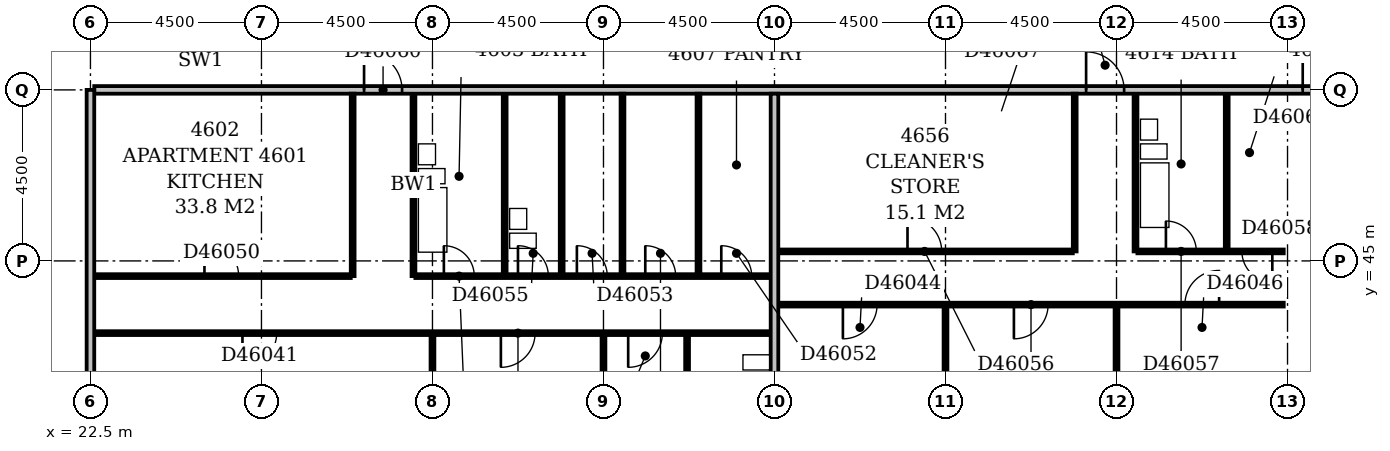
"""IFC4 building model, lengths in metres.
Left out: names, types, materials, properties, quantities, classifications, styles, units other than length and angle.
Written with IfcOpenShell. Run it as: python <this file> out.ifc"""

import sys

from ifc_helpers import new_model, si_unit, direction, frame, frame_2d, origin, place, context, subcontext, project, spatial, rectangle, extrude, element, fill, save


model = new_model("IFC4")
c1 = context("Model", 3, precision=1e-05, world=origin(), true_north=direction((0.0, 1.0)))
c2 = subcontext(c1, "Body", "Model", "MODEL_VIEW")
j1 = project(units=[si_unit("LENGTHUNIT", "METRE"), si_unit("PLANEANGLEUNIT", "RADIAN")], contexts=[c1])
p1 = place(None, origin())
s1 = spatial("IfcSite", under=j1, at=p1, CompositionType="ELEMENT")
p2 = place(p1, origin())
s2 = spatial("IfcBuilding", under=s1, at=p2, CompositionType="ELEMENT")
p3 = place(p2, frame((0.0, 0.0, 182.6)))
s3 = spatial("IfcBuildingStorey", under=s2, at=p3, CompositionType="ELEMENT", Elevation=182.6)
p4 = place(p3, frame((22.5, 36.45, 0.0), z_axis=(0.0, 0.0, 1.0), x_axis=(0.0, 1.0, 0.0)))
e1 = element("IfcWall", 1, at=p4, inside=s3, PredefinedType="PARTITIONING", context=c2, shape_type="SweptSolid", body=[
    extrude(rectangle(XDim=13.05, YDim=0.2, at=frame_2d((6.525, 0.0))), origin(), (0.0, 0.0, 1.0), 3.25),
])
p5 = place(p3, frame((31.5, 36.45, 0.0), z_axis=(0.0, 0.0, 1.0), x_axis=(0.0, 1.0, 0.0)))
e2 = element("IfcWall", 2, at=p5, inside=s3, PredefinedType="PARTITIONING", context=c2, shape_type="SweptSolid", body=[
    extrude(rectangle(XDim=6.6, YDim=0.1, at=frame_2d((3.3, 0.0))), origin(), (0.0, 0.0, 1.0), 3.25),
])
p6 = place(p3, frame((36.0, 36.45, 0.0), z_axis=(0.0, 0.0, 1.0), x_axis=(0.0, 1.0, 0.0)))
e3 = element("IfcWall", 3, at=p6, inside=s3, PredefinedType="PARTITIONING", context=c2, shape_type="SweptSolid", body=[
    extrude(rectangle(XDim=6.6, YDim=0.1, at=frame_2d((3.3, 0.0))), origin(), (0.0, 0.0, 1.0), 2.35),
])
p7 = place(p3, frame((40.5, 36.45, 0.0), z_axis=(0.0, 0.0, 1.0), x_axis=(0.0, 1.0, 0.0)))
e4 = element("IfcWall", 4, at=p7, inside=s3, PredefinedType="PARTITIONING", context=c2, shape_type="SweptSolid", body=[
    extrude(rectangle(XDim=12.95, YDim=0.2, at=frame_2d((6.475, 0.0))), origin(), (0.0, 0.0, 1.0), 3.25),
])
p8 = place(p3, frame((45.0, 36.45, 0.0), z_axis=(0.0, 0.0, 1.0), x_axis=(0.0, 1.0, 0.0)))
e5 = element("IfcWall", 5, at=p8, inside=s3, PredefinedType="PARTITIONING", context=c2, shape_type="SweptSolid", body=[
    extrude(rectangle(XDim=7.35, YDim=0.1, at=frame_2d((3.675, 0.0))), origin(), (0.0, 0.0, 1.0), 2.55),
])
p9 = place(p3, frame((49.5, 36.566, 0.0), z_axis=(0.0, 0.0, 1.0), x_axis=(0.0, 1.0, 0.0)))
e6 = element("IfcWall", 6, at=p9, inside=s3, PredefinedType="PARTITIONING", context=c2, shape_type="SweptSolid", body=[
    extrude(rectangle(XDim=7.234, YDim=0.1, at=frame_2d((3.617, 0.0))), origin(), (0.0, 0.0, 1.0), 3.25),
])
p10 = place(p3, frame((38.2, 40.2, 0.0), z_axis=(0.0, 0.0, 1.0), x_axis=(0.0, 1.0, 0.0)))
e7 = element("IfcWall", 7, at=p10, inside=s3, PredefinedType="PLUMBINGWALL", context=c2, shape_type="SweptSolid", body=[
    extrude(rectangle(XDim=2.85, YDim=0.1, at=frame_2d((1.425, 0.0))), origin(), (0.0, 0.0, 1.0), 3.25),
])
p11 = place(p10, frame((1.05, 0.0, 0.0)))
e8 = element("IfcOpeningElement", 8, at=p11, cuts=e7, PredefinedType="OPENING", context=c2, shape_type="SweptSolid", body=[
    extrude(rectangle(XDim=0.8, YDim=2.1, at=frame_2d((0.4, 1.05))), frame((0.0, 0.062, 0.0), z_axis=(0.0, -1.0, 0.0), x_axis=(1.0, 0.0, 0.0)), (0.0, 0.0, 1.0), 0.124),
])
p12 = place(p3, frame((22.6, 43.1, 0.0), z_axis=(0.0, 0.0, 1.0), x_axis=(1.0, 0.0, 0.0)))
e9 = element("IfcWall", 9, at=p12, inside=s3, PredefinedType="PARTITIONING", context=c2, shape_type="SweptSolid", body=[
    extrude(rectangle(XDim=17.8, YDim=0.1, at=frame_2d((8.9, 0.0))), origin(), (0.0, 0.0, 1.0), 3.25),
])
p13 = place(p12, frame((3.9, 0.0, 0.0)))
e10 = element("IfcOpeningElement", 10, at=p13, cuts=e9, PredefinedType="OPENING", context=c2, shape_type="SweptSolid", body=[
    extrude(rectangle(XDim=0.9, YDim=2.1, at=frame_2d((0.45, 1.05))), frame((0.0, 0.062, 0.0), z_axis=(0.0, -1.0, 0.0), x_axis=(1.0, 0.0, 0.0)), (0.0, 0.0, 1.0), 0.124),
])
p14 = place(p12, frame((10.7, 0.0, 0.0)))
e11 = element("IfcOpeningElement", 11, at=p14, cuts=e9, PredefinedType="OPENING", context=c2, shape_type="SweptSolid", body=[
    extrude(rectangle(XDim=0.9, YDim=2.1, at=frame_2d((0.45, 1.05))), frame((0.0, 0.062, 0.0), z_axis=(0.0, -1.0, 0.0), x_axis=(1.0, 0.0, 0.0)), (0.0, 0.0, 1.0), 0.124),
])
p15 = place(p12, frame((14.05, 0.0, 0.0)))
e12 = element("IfcOpeningElement", 12, at=p15, cuts=e9, PredefinedType="OPENING", context=c2, shape_type="SweptSolid", body=[
    extrude(rectangle(XDim=0.9, YDim=2.1, at=frame_2d((0.45, 1.05))), frame((0.0, 0.062, 0.0), z_axis=(0.0, -1.0, 0.0), x_axis=(1.0, 0.0, 0.0)), (0.0, 0.0, 1.0), 0.124),
])
p16 = place(p3, frame((40.6, 43.85, 0.0), z_axis=(0.0, 0.0, 1.0), x_axis=(1.0, 0.0, 0.0)))
e13 = element("IfcWall", 13, at=p16, inside=s3, PredefinedType="PARTITIONING", context=c2, shape_type="SweptSolid", body=[
    extrude(rectangle(XDim=13.3, YDim=0.1, at=frame_2d((6.65, 0.0))), origin(), (0.0, 0.0, 1.0), 3.25),
])
p17 = place(p16, frame((1.7, 0.0, 0.0)))
e14 = element("IfcOpeningElement", 14, at=p17, cuts=e13, PredefinedType="OPENING", context=c2, shape_type="SweptSolid", body=[
    extrude(rectangle(XDim=0.9, YDim=2.1, at=frame_2d((0.45, 1.05))), frame((0.0, 0.062, 0.0), z_axis=(0.0, -1.0, 0.0), x_axis=(1.0, 0.0, 0.0)), (0.0, 0.0, 1.0), 0.124),
])
p18 = place(p16, frame((6.2, 0.0, 0.0)))
e15 = element("IfcOpeningElement", 15, at=p18, cuts=e13, PredefinedType="OPENING", context=c2, shape_type="SweptSolid", body=[
    extrude(rectangle(XDim=0.9, YDim=2.1, at=frame_2d((0.45, 1.05))), frame((0.0, 0.062, 0.0), z_axis=(0.0, -1.0, 0.0), x_axis=(1.0, 0.0, 0.0)), (0.0, 0.0, 1.0), 0.124),
])
p19 = place(p16, frame((10.7, 0.0, 0.0)))
e16 = element("IfcOpeningElement", 16, at=p19, cuts=e13, PredefinedType="OPENING", context=c2, shape_type="SweptSolid", body=[
    extrude(rectangle(XDim=0.9, YDim=2.1, at=frame_2d((0.45, 1.05))), frame((0.0, 0.062, 0.0), z_axis=(0.0, -1.0, 0.0), x_axis=(1.0, 0.0, 0.0)), (0.0, 0.0, 1.0), 0.124),
])
p20 = place(p3, frame((22.6, 44.6, 0.0), z_axis=(0.0, 0.0, 1.0), x_axis=(1.0, 0.0, 0.0)))
e17 = element("IfcWall", 17, at=p20, inside=s3, PredefinedType="PARTITIONING", context=c2, shape_type="SweptSolid", body=[
    extrude(rectangle(XDim=6.75, YDim=0.1, at=frame_2d((3.375, 0.0))), origin(), (0.0, 0.0, 1.0), 3.25),
])
p21 = place(p20, frame((2.9, 0.0, 0.0)))
e18 = element("IfcOpeningElement", 18, at=p21, cuts=e17, PredefinedType="OPENING", context=c2, shape_type="SweptSolid", body=[
    extrude(rectangle(XDim=0.9, YDim=2.1, at=frame_2d((0.45, 1.05))), frame((0.0, 0.062, 0.0), z_axis=(0.0, -1.0, 0.0), x_axis=(1.0, 0.0, 0.0)), (0.0, 0.0, 1.0), 0.124),
])
p22 = place(p3, frame((29.4, 44.6, 0.0), z_axis=(0.0, 0.0, 1.0), x_axis=(0.0, 1.0, 0.0)))
e19 = element("IfcWall", 19, at=p22, inside=s3, PredefinedType="PARTITIONING", context=c2, shape_type="SweptSolid", body=[
    extrude(rectangle(XDim=4.8, YDim=0.1, at=frame_2d((2.4, 0.0))), origin(), (0.0, 0.0, 1.0), 3.25),
])
p23 = place(p3, frame((31.0, 44.6, 0.0), z_axis=(0.0, 0.0, 1.0), x_axis=(0.0, 1.0, 0.0)))
e20 = element("IfcWall", 20, at=p23, inside=s3, PredefinedType="PLUMBINGWALL", context=c2, shape_type="SweptSolid", body=[
    extrude(rectangle(XDim=4.8, YDim=0.1, at=frame_2d((2.4, 0.0))), origin(), (0.0, 0.0, 1.0), 3.25),
])
p24 = place(p3, frame((31.05, 44.6, 0.0), z_axis=(0.0, 0.0, 1.0), x_axis=(1.0, 0.0, 0.0)))
e21 = element("IfcWall", 21, at=p24, inside=s3, PredefinedType="PARTITIONING", context=c2, shape_type="SweptSolid", body=[
    extrude(rectangle(XDim=9.35, YDim=0.1, at=frame_2d((4.675, 0.0))), origin(), (0.0, 0.0, 1.0), 3.25),
])
p25 = place(p24, frame((0.75, 0.0, 0.0)))
e22 = element("IfcOpeningElement", 22, at=p25, cuts=e21, PredefinedType="OPENING", context=c2, shape_type="SweptSolid", body=[
    extrude(rectangle(XDim=0.8, YDim=2.1, at=frame_2d((0.4, 1.05))), frame((0.0, 0.062, 0.0), z_axis=(0.0, -1.0, 0.0), x_axis=(1.0, 0.0, 0.0)), (0.0, 0.0, 1.0), 0.124),
])
p26 = place(p24, frame((8.05, 0.0, 0.0)))
e23 = element("IfcOpeningElement", 23, at=p26, cuts=e21, PredefinedType="OPENING", context=c2, shape_type="SweptSolid", body=[
    extrude(rectangle(XDim=0.8, YDim=2.1, at=frame_2d((0.4, 1.05))), frame((0.0, 0.062, 0.0), z_axis=(0.0, -1.0, 0.0), x_axis=(1.0, 0.0, 0.0)), (0.0, 0.0, 1.0), 0.124),
])
p27 = place(p24, frame((4.25, 0.0, 0.0)))
e24 = element("IfcOpeningElement", 24, at=p27, cuts=e21, PredefinedType="OPENING", context=c2, shape_type="SweptSolid", body=[
    extrude(rectangle(XDim=0.8, YDim=2.1, at=frame_2d((0.4, 1.05))), frame((0.0, 0.062, 0.0), z_axis=(0.0, -1.0, 0.0), x_axis=(1.0, 0.0, 0.0)), (0.0, 0.0, 1.0), 0.124),
])
p28 = place(p24, frame((6.05, 0.0, 0.0)))
e25 = element("IfcOpeningElement", 25, at=p28, cuts=e21, PredefinedType="OPENING", context=c2, shape_type="SweptSolid", body=[
    extrude(rectangle(XDim=0.8, YDim=2.1, at=frame_2d((0.4, 1.05))), frame((0.0, 0.062, 0.0), z_axis=(0.0, -1.0, 0.0), x_axis=(1.0, 0.0, 0.0)), (0.0, 0.0, 1.0), 0.124),
])
p29 = place(p24, frame((2.7, 0.0, 0.0)))
e26 = element("IfcOpeningElement", 26, at=p29, cuts=e21, PredefinedType="OPENING", context=c2, shape_type="SweptSolid", body=[
    extrude(rectangle(XDim=0.8, YDim=2.1, at=frame_2d((0.4, 1.05))), frame((0.0, 0.062, 0.0), z_axis=(0.0, -1.0, 0.0), x_axis=(1.0, 0.0, 0.0)), (0.0, 0.0, 1.0), 0.124),
])
for number, where, z_axis, x_axis in (
    (27, (33.4, 44.65, 0.0), (0.0, 0.0, 1.0), (0.0, 1.0, 0.0)),
    (28, (34.9, 44.65, 0.0), (0.0, 0.0, 1.0), (0.0, 1.0, 0.0)),
):
    element("IfcWall", number, at=place(p3, frame(where, z_axis=z_axis, x_axis=x_axis)), inside=s3, PredefinedType="PLUMBINGWALL", context=c2, shape_type="SweptSolid", body=[
        extrude(rectangle(XDim=4.75, YDim=0.1, at=frame_2d((2.375, 0.0))), origin(), (0.0, 0.0, 1.0), 3.25),
    ])
p30 = place(p3, frame((36.5, 44.65, 0.0), z_axis=(0.0, 0.0, 1.0), x_axis=(0.0, 1.0, 0.0)))
e29 = element("IfcWall", 29, at=p30, inside=s3, PredefinedType="PARTITIONING", context=c2, shape_type="SweptSolid", body=[
    extrude(rectangle(XDim=4.75, YDim=0.1, at=frame_2d((2.375, 0.0))), origin(), (0.0, 0.0, 1.0), 2.35),
])
p31 = place(p3, frame((38.5, 44.65, 0.0), z_axis=(0.0, 0.0, 1.0), x_axis=(0.0, 1.0, 0.0)))
e30 = element("IfcWall", 30, at=p31, inside=s3, PredefinedType="PARTITIONING", context=c2, shape_type="SweptSolid", body=[
    extrude(rectangle(XDim=4.75, YDim=0.1, at=frame_2d((2.375, 0.0))), origin(), (0.0, 0.0, 1.0), 3.25),
])
p32 = place(p3, frame((40.6, 45.25, 0.0), z_axis=(0.0, 0.0, 1.0), x_axis=(1.0, 0.0, 0.0)))
e31 = element("IfcWall", 31, at=p32, inside=s3, PredefinedType="PARTITIONING", context=c2, shape_type="SweptSolid", body=[
    extrude(rectangle(XDim=7.75, YDim=0.1, at=frame_2d((3.875, 0.0))), origin(), (0.0, 0.0, 1.0), 3.25),
])
p33 = place(p32, frame((3.4, 0.0, 0.0)))
e32 = element("IfcOpeningElement", 32, at=p33, cuts=e31, PredefinedType="OPENING", context=c2, shape_type="SweptSolid", body=[
    extrude(rectangle(XDim=0.9, YDim=2.1, at=frame_2d((0.45, 1.05))), frame((0.0, 0.062, 0.0), z_axis=(0.0, -1.0, 0.0), x_axis=(1.0, 0.0, 0.0)), (0.0, 0.0, 1.0), 0.124),
])
p34 = place(p3, frame((48.4, 45.25, 0.0), z_axis=(0.0, 0.0, 1.0), x_axis=(0.0, 1.0, 0.0)))
e33 = element("IfcWall", 33, at=p34, inside=s3, PredefinedType="PARTITIONING", context=c2, shape_type="SweptSolid", body=[
    extrude(rectangle(XDim=4.15, YDim=0.1, at=frame_2d((2.075, 0.0))), origin(), (0.0, 0.0, 1.0), 3.25),
])
p35 = place(p3, frame((50.0, 45.25, 0.0), z_axis=(0.0, 0.0, 1.0), x_axis=(0.0, 1.0, 0.0)))
e34 = element("IfcWall", 34, at=p35, inside=s3, PredefinedType="PLUMBINGWALL", context=c2, shape_type="SweptSolid", body=[
    extrude(rectangle(XDim=4.15, YDim=0.1, at=frame_2d((2.075, 0.0))), origin(), (0.0, 0.0, 1.0), 3.25),
])
p36 = place(p3, frame((50.05, 45.25, 0.0), z_axis=(0.0, 0.0, 1.0), x_axis=(1.0, 0.0, 0.0)))
e35 = element("IfcWall", 35, at=p36, inside=s3, PredefinedType="PARTITIONING", context=c2, shape_type="SweptSolid", body=[
    extrude(rectangle(XDim=3.85, YDim=0.1, at=frame_2d((1.925, 0.0))), origin(), (0.0, 0.0, 1.0), 3.25),
])
p37 = place(p36, frame((0.75, 0.0, 0.0)))
e36 = element("IfcOpeningElement", 36, at=p37, cuts=e35, PredefinedType="OPENING", context=c2, shape_type="SweptSolid", body=[
    extrude(rectangle(XDim=0.8, YDim=2.1, at=frame_2d((0.4, 1.05))), frame((0.0, 0.062, 0.0), z_axis=(0.0, -1.0, 0.0), x_axis=(1.0, 0.0, 0.0)), (0.0, 0.0, 1.0), 0.124),
])
p38 = place(p36, frame((2.75, 0.0, 0.0)))
e37 = element("IfcOpeningElement", 37, at=p38, cuts=e35, PredefinedType="OPENING", context=c2, shape_type="SweptSolid", body=[
    extrude(rectangle(XDim=0.8, YDim=2.1, at=frame_2d((0.4, 1.05))), frame((0.0, 0.062, 0.0), z_axis=(0.0, -1.0, 0.0), x_axis=(1.0, 0.0, 0.0)), (0.0, 0.0, 1.0), 0.124),
])
p39 = place(p3, frame((52.4, 45.3, 0.0), z_axis=(0.0, 0.0, 1.0), x_axis=(0.0, 1.0, 0.0)))
e38 = element("IfcWall", 38, at=p39, inside=s3, PredefinedType="PLUMBINGWALL", context=c2, shape_type="SweptSolid", body=[
    extrude(rectangle(XDim=4.1, YDim=0.1, at=frame_2d((2.05, 0.0))), origin(), (0.0, 0.0, 1.0), 3.25),
])
p40 = place(p3, frame((22.6, 49.5, 0.0), z_axis=(0.0, 0.0, 1.0), x_axis=(1.0, 0.0, 0.0)))
e39 = element("IfcWall", 39, at=p40, inside=s3, PredefinedType="PARTITIONING", context=c2, shape_type="SweptSolid", body=[
    extrude(rectangle(XDim=44.45, YDim=0.2, at=frame_2d((22.225, 0.0))), origin(), (0.0, 0.0, 1.0), 3.25),
])
p41 = place(p40, frame((7.1, 0.0, 0.0)))
e40 = element("IfcOpeningElement", 40, at=p41, cuts=e39, PredefinedType="OPENING", context=c2, shape_type="SweptSolid", body=[
    extrude(rectangle(XDim=1.0, YDim=2.1, at=frame_2d((0.5, 1.05))), frame((0.0, 0.112, 0.0), z_axis=(0.0, -1.0, 0.0), x_axis=(1.0, 0.0, 0.0)), (0.0, 0.0, 1.0), 0.224),
])
p42 = place(p40, frame((26.1, 0.0, 0.0)))
e41 = element("IfcOpeningElement", 41, at=p42, cuts=e39, PredefinedType="OPENING", context=c2, shape_type="SweptSolid", body=[
    extrude(rectangle(XDim=1.0, YDim=2.1, at=frame_2d((0.5, 1.05))), frame((0.0, 0.112, 0.0), z_axis=(0.0, -1.0, 0.0), x_axis=(1.0, 0.0, 0.0)), (0.0, 0.0, 1.0), 0.224),
])
p43 = place(p40, frame((31.8, 0.0, 0.0)))
e42 = element("IfcOpeningElement", 42, at=p43, cuts=e39, PredefinedType="OPENING", context=c2, shape_type="SweptSolid", body=[
    extrude(rectangle(XDim=1.0, YDim=2.1, at=frame_2d((0.5, 1.05))), frame((0.0, 0.112, 0.0), z_axis=(0.0, -1.0, 0.0), x_axis=(1.0, 0.0, 0.0)), (0.0, 0.0, 1.0), 0.224),
])
p44 = place(p13, frame((0.9, 0.0, 0.0), z_axis=(0.0, 0.0, 1.0), x_axis=(-1.0, 0.0, 0.0)))
e43 = element("IfcDoor", 43, at=p44, inside=s3, OperationType="SINGLE_SWING_RIGHT", PredefinedType="DOOR", context=c2, shape_type="SweptSolid", body=[
    extrude(rectangle(XDim=0.9, YDim=2.1, at=frame_2d((0.45, 1.05))), frame((0.0, 0.025, 0.0), z_axis=(0.0, -1.0, 0.0), x_axis=(1.0, 0.0, 0.0)), (0.0, 0.0, 1.0), 0.05),
])
fill(e10, e43)
p45 = place(p14, frame((0.9, 0.0, 0.0), z_axis=(0.0, 0.0, 1.0), x_axis=(-1.0, 0.0, 0.0)))
e44 = element("IfcDoor", 44, at=p45, inside=s3, OperationType="SINGLE_SWING_RIGHT", PredefinedType="DOOR", context=c2, shape_type="SweptSolid", body=[
    extrude(rectangle(XDim=0.9, YDim=2.1, at=frame_2d((0.45, 1.05))), frame((0.0, 0.025, 0.0), z_axis=(0.0, -1.0, 0.0), x_axis=(1.0, 0.0, 0.0)), (0.0, 0.0, 1.0), 0.05),
])
fill(e11, e44)
p46 = place(p15, frame((0.9, 0.0, 0.0), z_axis=(0.0, 0.0, 1.0), x_axis=(-1.0, 0.0, 0.0)))
e45 = element("IfcDoor", 45, at=p46, inside=s3, OperationType="SINGLE_SWING_RIGHT", PredefinedType="DOOR", context=c2, shape_type="SweptSolid", body=[
    extrude(rectangle(XDim=0.9, YDim=2.1, at=frame_2d((0.45, 1.05))), frame((0.0, 0.025, 0.0), z_axis=(0.0, -1.0, 0.0), x_axis=(1.0, 0.0, 0.0)), (0.0, 0.0, 1.0), 0.05),
])
fill(e12, e45)
p47 = place(p17, frame((0.9, 0.0, 0.0), z_axis=(0.0, 0.0, 1.0), x_axis=(-1.0, 0.0, 0.0)))
e46 = element("IfcDoor", 46, at=p47, inside=s3, OperationType="SINGLE_SWING_RIGHT", PredefinedType="DOOR", context=c2, shape_type="SweptSolid", body=[
    extrude(rectangle(XDim=0.9, YDim=2.1, at=frame_2d((0.45, 1.05))), frame((0.0, 0.025, 0.0), z_axis=(0.0, -1.0, 0.0), x_axis=(1.0, 0.0, 0.0)), (0.0, 0.0, 1.0), 0.05),
])
fill(e14, e46)
p48 = place(p18, frame((0.9, 0.0, 0.0), z_axis=(0.0, 0.0, 1.0), x_axis=(-1.0, 0.0, 0.0)))
e47 = element("IfcDoor", 47, at=p48, inside=s3, OperationType="SINGLE_SWING_RIGHT", PredefinedType="DOOR", context=c2, shape_type="SweptSolid", body=[
    extrude(rectangle(XDim=0.9, YDim=2.1, at=frame_2d((0.45, 1.05))), frame((0.0, 0.025, 0.0), z_axis=(0.0, -1.0, 0.0), x_axis=(1.0, 0.0, 0.0)), (0.0, 0.0, 1.0), 0.05),
])
fill(e15, e47)
p49 = place(p19, frame((0.9, 0.0, 0.0), z_axis=(0.0, 0.0, 1.0), x_axis=(-1.0, 0.0, 0.0)))
e48 = element("IfcDoor", 48, at=p49, inside=s3, OperationType="SINGLE_SWING_LEFT", PredefinedType="DOOR", context=c2, shape_type="SweptSolid", body=[
    extrude(rectangle(XDim=0.9, YDim=2.1, at=frame_2d((0.45, 1.05))), frame((0.0, 0.025, 0.0), z_axis=(0.0, -1.0, 0.0), x_axis=(1.0, 0.0, 0.0)), (0.0, 0.0, 1.0), 0.05),
])
fill(e16, e48)
p50 = place(p21, origin())
e49 = element("IfcDoor", 49, at=p50, inside=s3, OperationType="SINGLE_SWING_LEFT", PredefinedType="DOOR", context=c2, shape_type="SweptSolid", body=[
    extrude(rectangle(XDim=0.9, YDim=2.1, at=frame_2d((0.45, 1.05))), frame((0.0, 0.025, 0.0), z_axis=(0.0, -1.0, 0.0), x_axis=(1.0, 0.0, 0.0)), (0.0, 0.0, 1.0), 0.05),
])
fill(e18, e49)
p51 = place(p25, origin())
e50 = element("IfcDoor", 50, at=p51, inside=s3, OperationType="SINGLE_SWING_LEFT", PredefinedType="DOOR", context=c2, shape_type="SweptSolid", body=[
    extrude(rectangle(XDim=0.8, YDim=2.1, at=frame_2d((0.4, 1.05))), frame((0.0, 0.025, 0.0), z_axis=(0.0, -1.0, 0.0), x_axis=(1.0, 0.0, 0.0)), (0.0, 0.0, 1.0), 0.05),
])
fill(e22, e50)
p52 = place(p26, origin())
e51 = element("IfcDoor", 51, at=p52, inside=s3, OperationType="SINGLE_SWING_LEFT", PredefinedType="DOOR", context=c2, shape_type="SweptSolid", body=[
    extrude(rectangle(XDim=0.8, YDim=2.1, at=frame_2d((0.4, 1.05))), frame((0.0, 0.025, 0.0), z_axis=(0.0, -1.0, 0.0), x_axis=(1.0, 0.0, 0.0)), (0.0, 0.0, 1.0), 0.05),
])
fill(e23, e51)
p53 = place(p27, origin())
e52 = element("IfcDoor", 52, at=p53, inside=s3, OperationType="SINGLE_SWING_LEFT", PredefinedType="DOOR", context=c2, shape_type="SweptSolid", body=[
    extrude(rectangle(XDim=0.8, YDim=2.1, at=frame_2d((0.4, 1.05))), frame((0.0, 0.025, 0.0), z_axis=(0.0, -1.0, 0.0), x_axis=(1.0, 0.0, 0.0)), (0.0, 0.0, 1.0), 0.05),
])
fill(e24, e52)
p54 = place(p28, origin())
e53 = element("IfcDoor", 53, at=p54, inside=s3, OperationType="SINGLE_SWING_LEFT", PredefinedType="DOOR", context=c2, shape_type="SweptSolid", body=[
    extrude(rectangle(XDim=0.8, YDim=2.1, at=frame_2d((0.4, 1.05))), frame((0.0, 0.025, 0.0), z_axis=(0.0, -1.0, 0.0), x_axis=(1.0, 0.0, 0.0)), (0.0, 0.0, 1.0), 0.05),
])
fill(e25, e53)
p55 = place(p29, origin())
e54 = element("IfcDoor", 54, at=p55, inside=s3, OperationType="SINGLE_SWING_LEFT", PredefinedType="DOOR", context=c2, shape_type="SweptSolid", body=[
    extrude(rectangle(XDim=0.8, YDim=2.1, at=frame_2d((0.4, 1.05))), frame((0.0, 0.025, 0.0), z_axis=(0.0, -1.0, 0.0), x_axis=(1.0, 0.0, 0.0)), (0.0, 0.0, 1.0), 0.05),
])
fill(e26, e54)
p56 = place(p33, origin())
e55 = element("IfcDoor", 55, at=p56, inside=s3, OperationType="SINGLE_SWING_LEFT", PredefinedType="DOOR", context=c2, shape_type="SweptSolid", body=[
    extrude(rectangle(XDim=0.9, YDim=2.1, at=frame_2d((0.45, 1.05))), frame((0.0, 0.025, 0.0), z_axis=(0.0, -1.0, 0.0), x_axis=(1.0, 0.0, 0.0)), (0.0, 0.0, 1.0), 0.05),
])
fill(e32, e55)
p57 = place(p37, origin())
e56 = element("IfcDoor", 56, at=p57, inside=s3, OperationType="SINGLE_SWING_LEFT", PredefinedType="DOOR", context=c2, shape_type="SweptSolid", body=[
    extrude(rectangle(XDim=0.8, YDim=2.1, at=frame_2d((0.4, 1.05))), frame((0.0, 0.025, 0.0), z_axis=(0.0, -1.0, 0.0), x_axis=(1.0, 0.0, 0.0)), (0.0, 0.0, 1.0), 0.05),
])
fill(e36, e56)
p58 = place(p38, origin())
e57 = element("IfcDoor", 57, at=p58, inside=s3, OperationType="SINGLE_SWING_RIGHT", PredefinedType="DOOR", context=c2, shape_type="SweptSolid", body=[
    extrude(rectangle(XDim=0.8, YDim=2.1, at=frame_2d((0.4, 1.05))), frame((0.0, 0.025, 0.0), z_axis=(0.0, -1.0, 0.0), x_axis=(1.0, 0.0, 0.0)), (0.0, 0.0, 1.0), 0.05),
])
fill(e37, e57)
p59 = place(p41, origin())
e58 = element("IfcDoor", 58, at=p59, inside=s3, OperationType="SINGLE_SWING_LEFT", PredefinedType="DOOR", context=c2, shape_type="SweptSolid", body=[
    extrude(rectangle(XDim=1.0, YDim=2.1, at=frame_2d((0.5, 1.05))), frame((0.0, 0.025, 0.0), z_axis=(0.0, -1.0, 0.0), x_axis=(1.0, 0.0, 0.0)), (0.0, 0.0, 1.0), 0.05),
])
fill(e40, e58)
p60 = place(p42, origin())
e59 = element("IfcDoor", 59, at=p60, inside=s3, OperationType="SINGLE_SWING_LEFT", PredefinedType="DOOR", context=c2, shape_type="SweptSolid", body=[
    extrude(rectangle(XDim=1.0, YDim=2.1, at=frame_2d((0.5, 1.05))), frame((0.0, 0.025, 0.0), z_axis=(0.0, -1.0, 0.0), x_axis=(1.0, 0.0, 0.0)), (0.0, 0.0, 1.0), 0.05),
])
fill(e41, e59)
p61 = place(p43, origin())
e60 = element("IfcDoor", 60, at=p61, inside=s3, OperationType="SINGLE_SWING_LEFT", PredefinedType="DOOR", context=c2, shape_type="SweptSolid", body=[
    extrude(rectangle(XDim=1.0, YDim=2.1, at=frame_2d((0.5, 1.05))), frame((0.0, 0.025, 0.0), z_axis=(0.0, -1.0, 0.0), x_axis=(1.0, 0.0, 0.0)), (0.0, 0.0, 1.0), 0.05),
])
fill(e42, e60)
save(model, sys.argv[1])
